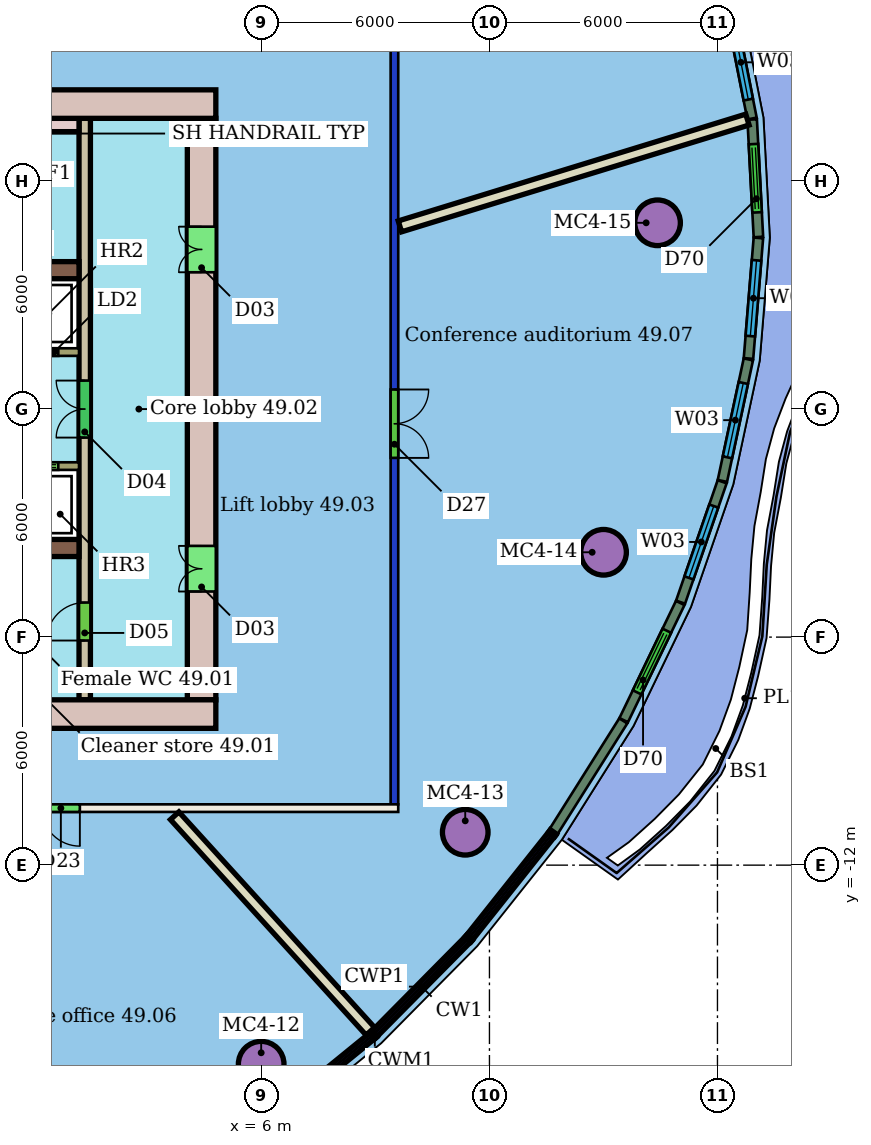
"""IFC4 building model, lengths in metres.
Left out: names, types, materials, properties, quantities, classifications, styles, units other than length and angle.
Written with IfcOpenShell. Run it as: python <this file> out.ifc"""

import sys

from ifc_helpers import new_model, si_unit, direction, frame, frame_2d, origin, origin_2d, place, context, subcontext, project, spatial, rectangle, hollow_circle, extrude, element, fill, save


model = new_model("IFC4")
c1 = context("Model", 3, precision=1e-05, world=origin(), true_north=direction((0.0, 1.0)))
c2 = subcontext(c1, "Body", "Model", "MODEL_VIEW")
j1 = project(units=[si_unit("LENGTHUNIT", "METRE"), si_unit("PLANEANGLEUNIT", "RADIAN")], contexts=[c1])
p1 = place(None, origin())
s1 = spatial("IfcSite", under=j1, at=p1, CompositionType="ELEMENT")
p2 = place(p1, origin())
s2 = spatial("IfcBuilding", under=s1, at=p2, CompositionType="ELEMENT")
p3 = place(p2, frame((0.0, 0.0, 202.9)))
s3 = spatial("IfcBuildingStorey", under=s2, at=p3, CompositionType="ELEMENT", Elevation=202.9)
for number, where, z_axis, x_axis in (
    (1, (5.993, -17.237, 0.0), (0.0, 0.0, 1.0), (1.0, 0.0, 0.0)),
    (2, (11.363, -11.134, 0.0), (0.0, 0.0, 1.0), (1.0, 0.0, 0.0)),
    (3, (15.003, -3.768, 0.0), (0.0, 0.0, 1.0), (1.0, 0.0, 0.0)),
    (4, (16.424, 4.901, 0.0), (0.0, 0.0, 1.0), (1.0, 0.0, 0.0)),
):
    element("IfcColumn", number, at=place(p3, frame(where, z_axis=z_axis, x_axis=x_axis)), inside=s3, PredefinedType="COLUMN", context=c2, shape_type="SweptSolid", body=[
        extrude(hollow_circle(Radius=0.6, WallThickness=0.045, at=origin_2d()), origin(), (0.0, 0.0, 1.0), 3.45),
    ])
p4 = place(p3, frame((9.6, -10.5, 0.0), z_axis=(0.0, 0.0, 1.0), x_axis=(-1.0, 0.0, 0.0)))
e5 = element("IfcWall", 5, at=p4, inside=s3, PredefinedType="PARTITIONING", context=c2, shape_type="SweptSolid", body=[
    extrude(rectangle(XDim=31.2, YDim=0.2, at=frame_2d((15.6, 0.0))), origin(), (0.0, 0.0, 1.0), 3.45),
])
p5 = place(p4, frame((22.002, 0.0, 0.0)))
e6 = element("IfcOpeningElement", 6, at=p5, cuts=e5, PredefinedType="OPENING", context=c2, shape_type="SweptSolid", body=[
    extrude(rectangle(XDim=1.8, YDim=2.1, at=frame_2d((0.9, 1.05))), frame((0.0, 0.11, 0.0), z_axis=(0.0, -1.0, 0.0), x_axis=(1.0, 0.0, 0.0)), (0.0, 0.0, 1.0), 0.22),
])
p6 = place(p4, frame((16.448, 0.0, 0.0)))
e7 = element("IfcOpeningElement", 7, at=p6, cuts=e5, PredefinedType="OPENING", context=c2, shape_type="SweptSolid", body=[
    extrude(rectangle(XDim=1.0, YDim=2.4, at=frame_2d((0.5, 1.2))), frame((0.0, 0.11, 0.0), z_axis=(0.0, -1.0, 0.0), x_axis=(1.0, 0.0, 0.0)), (0.0, 0.0, 1.0), 0.22),
])
p7 = place(p4, frame((8.378, 0.0, 0.0)))
e8 = element("IfcOpeningElement", 8, at=p7, cuts=e5, PredefinedType="OPENING", context=c2, shape_type="SweptSolid", body=[
    extrude(rectangle(XDim=1.0, YDim=2.4, at=frame_2d((0.5, 1.2))), frame((0.0, 0.11, 0.0), z_axis=(0.0, -1.0, 0.0), x_axis=(1.0, 0.0, 0.0)), (0.0, 0.0, 1.0), 0.22),
])
p8 = place(p3, frame((9.5, 10.4, 0.0), z_axis=(0.0, 0.0, 1.0), x_axis=(0.0, -1.0, 0.0)))
e9 = element("IfcWall", 9, at=p8, inside=s3, PredefinedType="PARTITIONING", context=c2, shape_type="SweptSolid", body=[
    extrude(rectangle(XDim=20.8, YDim=0.2, at=frame_2d((10.4, 0.0))), origin(), (0.0, 0.0, 1.0), 3.05),
])
p9 = place(p8, frame((9.885, 0.0, 0.0)))
e10 = element("IfcOpeningElement", 10, at=p9, cuts=e9, PredefinedType="OPENING", context=c2, shape_type="SweptSolid", body=[
    extrude(rectangle(XDim=1.8, YDim=2.4, at=frame_2d((0.9, 1.2))), frame((0.0, 0.11, 0.0), z_axis=(0.0, -1.0, 0.0), x_axis=(1.0, 0.0, 0.0)), (0.0, 0.0, 1.0), 0.22),
])
p10 = place(p3, frame((8.865, -16.371, 0.0), z_axis=(0.0, 0.0, 1.0), x_axis=(-0.672244315529, 0.740329372806, 0.0)))
e11 = element("IfcWall", 11, at=p10, inside=s3, PredefinedType="PARTITIONING", context=c2, shape_type="SweptSolid", body=[
    extrude(rectangle(XDim=7.659, YDim=0.3, at=frame_2d((3.83, 0.0))), origin(), (0.0, 0.0, 1.0), 3.45),
])
p11 = place(p3, frame((18.788, 7.617, 0.0), z_axis=(0.0, 0.0, 1.0), x_axis=(-0.955883790435, -0.293745092188, 0.0)))
e12 = element("IfcWall", 12, at=p11, inside=s3, PredefinedType="PARTITIONING", context=c2, shape_type="SweptSolid", body=[
    extrude(rectangle(XDim=9.566, YDim=0.3, at=frame_2d((4.783, 0.0))), origin(), (0.0, 0.0, 1.0), 3.45),
])
p12 = place(p3, frame((13.69, -11.112, 0.0), z_axis=(0.0, 0.0, 1.0), x_axis=(0.53307325399, 0.846069090489, 0.0)))
e13 = element("IfcWall", 13, at=p12, inside=s3, PredefinedType="SOLIDWALL", context=c2, shape_type="SweptSolid", body=[
    extrude(rectangle(XDim=3.437, YDim=0.25, at=frame_2d((1.718, 0.0))), origin(), (0.0, 0.0, 1.0), 3.1),
])
p13 = place(p3, frame((15.533, -8.185, 0.0), z_axis=(0.0, 0.0, 1.0), x_axis=(0.434561601859, 0.900642112156, 0.0)))
e14 = element("IfcWall", 14, at=p13, inside=s3, PredefinedType="SOLIDWALL", context=c2, shape_type="SweptSolid", body=[
    extrude(rectangle(XDim=3.424, YDim=0.25, at=frame_2d((1.712, 0.0))), origin(), (0.0, 0.0, 1.0), 3.1),
])
p14 = place(p13, frame((0.812, 0.0, 0.0)))
e15 = element("IfcOpeningElement", 15, at=p14, cuts=e14, PredefinedType="OPENING", context=c2, shape_type="SweptSolid", body=[
    extrude(rectangle(XDim=1.8, YDim=2.4, at=frame_2d((0.9, 1.2))), frame((0.0, 0.135, 0.0), z_axis=(0.0, -1.0, 0.0), x_axis=(1.0, 0.0, 0.0)), (0.0, 0.0, 1.0), 0.27),
])
p15 = place(p3, frame((17.029, -5.081, 0.0), z_axis=(0.0, 0.0, 1.0), x_axis=(0.326545099428, 0.945181621721, 0.0)))
e16 = element("IfcWall", 16, at=p15, inside=s3, PredefinedType="SOLIDWALL", context=c2, shape_type="SweptSolid", body=[
    extrude(rectangle(XDim=3.352, YDim=0.25, at=frame_2d((1.676, 0.0))), origin(), (0.0, 0.0, 1.0), 3.1),
])
p16 = place(p15, frame((0.676, 0.0, 0.9)))
e17 = element("IfcOpeningElement", 17, at=p16, cuts=e16, PredefinedType="OPENING", context=c2, shape_type="SweptSolid", body=[
    extrude(rectangle(XDim=2.0, YDim=2.1, at=frame_2d((1.0, 1.05))), frame((0.0, 0.135, 0.0), z_axis=(0.0, -1.0, 0.0), x_axis=(1.0, 0.0, 0.0)), (0.0, 0.0, 1.0), 0.27),
])
p17 = place(p3, frame((18.13, -1.89, 0.0), z_axis=(0.0, 0.0, 1.0), x_axis=(0.208906976356, 0.977935516908, 0.0)))
e18 = element("IfcWall", 18, at=p17, inside=s3, PredefinedType="SOLIDWALL", context=c2, shape_type="SweptSolid", body=[
    extrude(rectangle(XDim=3.27, YDim=0.25, at=frame_2d((1.635, 0.0))), origin(), (0.0, 0.0, 1.0), 3.1),
])
p18 = place(p17, frame((0.635, 0.0, 0.9)))
e19 = element("IfcOpeningElement", 19, at=p18, cuts=e18, PredefinedType="OPENING", context=c2, shape_type="SweptSolid", body=[
    extrude(rectangle(XDim=2.0, YDim=2.1, at=frame_2d((1.0, 1.05))), frame((0.0, 0.135, 0.0), z_axis=(0.0, -1.0, 0.0), x_axis=(1.0, 0.0, 0.0)), (0.0, 0.0, 1.0), 0.27),
])
p19 = place(p3, frame((18.816, 1.331, 0.0), z_axis=(0.0, 0.0, 1.0), x_axis=(0.082004278311, 0.996631977381, 0.0)))
e20 = element("IfcWall", 20, at=p19, inside=s3, PredefinedType="SOLIDWALL", context=c2, shape_type="SweptSolid", body=[
    extrude(rectangle(XDim=3.183, YDim=0.25, at=frame_2d((1.591, 0.0))), origin(), (0.0, 0.0, 1.0), 3.1),
])
p20 = place(p19, frame((0.591, 0.0, 0.9)))
e21 = element("IfcOpeningElement", 21, at=p20, cuts=e20, PredefinedType="OPENING", context=c2, shape_type="SweptSolid", body=[
    extrude(rectangle(XDim=2.0, YDim=2.1, at=frame_2d((1.0, 1.05))), frame((0.0, 0.135, 0.0), z_axis=(0.0, -1.0, 0.0), x_axis=(1.0, 0.0, 0.0)), (0.0, 0.0, 1.0), 0.27),
])
p21 = place(p3, frame((19.078, 4.528, 0.0), z_axis=(0.0, 0.0, 1.0), x_axis=(-0.053150699104, 0.998586502605, 0.0)))
e22 = element("IfcWall", 22, at=p21, inside=s3, PredefinedType="SOLIDWALL", context=c2, shape_type="SweptSolid", body=[
    extrude(rectangle(XDim=3.096, YDim=0.25, at=frame_2d((1.548, 0.0))), origin(), (0.0, 0.0, 1.0), 3.1),
])
p22 = place(p21, frame((0.648, 0.0, 0.0)))
e23 = element("IfcOpeningElement", 23, at=p22, cuts=e22, PredefinedType="OPENING", context=c2, shape_type="SweptSolid", body=[
    extrude(rectangle(XDim=1.8, YDim=2.4, at=frame_2d((0.9, 1.2))), frame((0.0, 0.135, 0.0), z_axis=(0.0, -1.0, 0.0), x_axis=(1.0, 0.0, 0.0)), (0.0, 0.0, 1.0), 0.27),
])
p23 = place(p3, frame((18.91, 7.645, 0.0), z_axis=(0.0, 0.0, 1.0), x_axis=(-0.194200963519, 0.980961765702, 0.0)))
e24 = element("IfcWall", 24, at=p23, inside=s3, PredefinedType="SOLIDWALL", context=c2, shape_type="SweptSolid", body=[
    extrude(rectangle(XDim=3.016, YDim=0.25, at=frame_2d((1.508, 0.0))), origin(), (0.0, 0.0, 1.0), 3.1),
])
p24 = place(p23, frame((0.508, 0.0, 0.9)))
e25 = element("IfcOpeningElement", 25, at=p24, cuts=e24, PredefinedType="OPENING", context=c2, shape_type="SweptSolid", body=[
    extrude(rectangle(XDim=2.0, YDim=2.1, at=frame_2d((1.0, 1.05))), frame((0.0, 0.135, 0.0), z_axis=(0.0, -1.0, 0.0), x_axis=(1.0, 0.0, 0.0)), (0.0, 0.0, 1.0), 0.27),
])
p25 = place(p3, frame((4.8, 8.025, 0.0), z_axis=(0.0, 0.0, 1.0), x_axis=(-1.0, 0.0, 0.0)))
e26 = element("IfcWall", 26, at=p25, inside=s3, PredefinedType="SHEAR", context=c2, shape_type="SweptSolid", body=[
    extrude(rectangle(XDim=10.8, YDim=0.75, at=frame_2d((5.4, 0.0))), origin(), (0.0, 0.0, 1.0), 3.3),
])
p26 = place(p25, frame((4.4, 0.0, 0.0)))
e27 = element("IfcOpeningElement", 27, at=p26, cuts=e26, PredefinedType="OPENING", context=c2, shape_type="SweptSolid", body=[
    extrude(rectangle(XDim=1.2, YDim=2.1, at=frame_2d((0.6, 1.05))), frame((0.0, 0.385, 0.0), z_axis=(0.0, -1.0, 0.0), x_axis=(1.0, 0.0, 0.0)), (0.0, 0.0, 1.0), 0.77),
])
p27 = place(p3, frame((-16.8, -8.025, 0.0), z_axis=(0.0, 0.0, 1.0), x_axis=(1.0, 0.0, 0.0)))
e28 = element("IfcWall", 28, at=p27, inside=s3, PredefinedType="SHEAR", context=c2, shape_type="SweptSolid", body=[
    extrude(rectangle(XDim=21.6, YDim=0.75, at=frame_2d((10.8, 0.0))), origin(), (0.0, 0.0, 1.0), 3.3),
])
p28 = place(p27, frame((4.8, 0.0, 0.0)))
e29 = element("IfcOpeningElement", 29, at=p28, cuts=e28, PredefinedType="OPENING", context=c2, shape_type="SweptSolid", body=[
    extrude(rectangle(XDim=1.2, YDim=2.1, at=frame_2d((0.6, 1.05))), frame((0.0, 0.385, 0.0), z_axis=(0.0, -1.0, 0.0), x_axis=(1.0, 0.0, 0.0)), (0.0, 0.0, 1.0), 0.77),
])
p29 = place(p3, frame((4.425, -7.65, 0.0), z_axis=(0.0, 0.0, 1.0), x_axis=(0.0, 1.0, 0.0)))
e30 = element("IfcWall", 30, at=p29, inside=s3, PredefinedType="SHEAR", context=c2, shape_type="SweptSolid", body=[
    extrude(rectangle(XDim=15.3, YDim=0.75, at=frame_2d((7.65, 0.0))), origin(), (0.0, 0.0, 1.0), 3.3),
])
p30 = place(p29, frame((2.85, 0.0, 0.0)))
e31 = element("IfcOpeningElement", 31, at=p30, cuts=e30, PredefinedType="OPENING", context=c2, shape_type="SweptSolid", body=[
    extrude(rectangle(XDim=1.2, YDim=2.1, at=frame_2d((0.6, 1.05))), frame((0.0, 0.385, 0.0), z_axis=(0.0, -1.0, 0.0), x_axis=(1.0, 0.0, 0.0)), (0.0, 0.0, 1.0), 0.77),
])
p31 = place(p29, frame((11.25, 0.0, 0.0)))
e32 = element("IfcOpeningElement", 32, at=p31, cuts=e30, PredefinedType="OPENING", context=c2, shape_type="SweptSolid", body=[
    extrude(rectangle(XDim=1.2, YDim=2.1, at=frame_2d((0.6, 1.05))), frame((0.0, 0.385, 0.0), z_axis=(0.0, -1.0, 0.0), x_axis=(1.0, 0.0, 0.0)), (0.0, 0.0, 1.0), 0.77),
])
for number, where, z_axis, x_axis in (
    (33, (-6.0, 3.655, 0.0), (0.0, 0.0, 1.0), (1.0, 0.0, 0.0)),
    (34, (-6.0, -3.655, 0.0), (0.0, 0.0, 1.0), (1.0, 0.0, 0.0)),
):
    element("IfcWall", number, at=place(p3, frame(where, z_axis=z_axis, x_axis=x_axis)), inside=s3, PredefinedType="SHEAR", context=c2, shape_type="SweptSolid", body=[
        extrude(rectangle(XDim=7.2, YDim=0.45, at=frame_2d((3.6, 0.0))), origin(), (0.0, 0.0, 1.0), 3.3),
    ])
p32 = place(p3, frame((1.35, -7.65, 0.0), z_axis=(0.0, 0.0, 1.0), x_axis=(0.0, 1.0, 0.0)))
e35 = element("IfcWall", 35, at=p32, inside=s3, PredefinedType="SHEAR", context=c2, shape_type="SweptSolid", body=[
    extrude(rectangle(XDim=15.3, YDim=0.3, at=frame_2d((7.65, 0.0))), origin(), (0.0, 0.0, 1.0), 3.3),
])
p33 = place(p32, frame((1.56, 0.0, 0.0)))
e36 = element("IfcOpeningElement", 36, at=p33, cuts=e35, PredefinedType="OPENING", context=c2, shape_type="SweptSolid", body=[
    extrude(rectangle(XDim=1.0, YDim=2.1, at=frame_2d((0.5, 1.05))), frame((0.0, 0.16, 0.0), z_axis=(0.0, -1.0, 0.0), x_axis=(1.0, 0.0, 0.0)), (0.0, 0.0, 1.0), 0.32),
])
p34 = place(p32, frame((6.9, 0.0, 0.0)))
e37 = element("IfcOpeningElement", 37, at=p34, cuts=e35, PredefinedType="OPENING", context=c2, shape_type="SweptSolid", body=[
    extrude(rectangle(XDim=1.5, YDim=2.1, at=frame_2d((0.75, 1.05))), frame((0.0, 0.16, 0.0), z_axis=(0.0, -1.0, 0.0), x_axis=(1.0, 0.0, 0.0)), (0.0, 0.0, 1.0), 0.32),
])
p35 = place(p3, frame((-13.2, 1.5, 0.0), z_axis=(0.0, 0.0, 1.0), x_axis=(1.0, 0.0, 0.0)))
e38 = element("IfcWall", 38, at=p35, inside=s3, PredefinedType="SHEAR", context=c2, shape_type="SweptSolid", body=[
    extrude(rectangle(XDim=14.4, YDim=0.2, at=frame_2d((7.2, 0.0))), origin(), (0.0, 0.0, 1.0), 3.3),
])
p36 = place(p35, frame((10.312, 0.0, 0.0)))
e39 = element("IfcOpeningElement", 39, at=p36, cuts=e38, PredefinedType="OPENING", context=c2, shape_type="SweptSolid", body=[
    extrude(rectangle(XDim=1.1, YDim=2.1, at=frame_2d((0.55, 1.05))), frame((0.0, 0.11, 0.0), z_axis=(0.0, -1.0, 0.0), x_axis=(1.0, 0.0, 0.0)), (0.0, 0.0, 1.0), 0.22),
])
p37 = place(p35, frame((12.754, 0.0, 0.0)))
e40 = element("IfcOpeningElement", 40, at=p37, cuts=e38, PredefinedType="OPENING", context=c2, shape_type="SweptSolid", body=[
    extrude(rectangle(XDim=1.1, YDim=2.1, at=frame_2d((0.55, 1.05))), frame((0.0, 0.11, 0.0), z_axis=(0.0, -1.0, 0.0), x_axis=(1.0, 0.0, 0.0)), (0.0, 0.0, 1.0), 0.22),
])
p38 = place(p35, frame((0.15, 0.0, 0.0)))
e41 = element("IfcOpeningElement", 41, at=p38, cuts=e38, PredefinedType="OPENING", context=c2, shape_type="SweptSolid", body=[
    extrude(rectangle(XDim=1.0, YDim=2.1, at=frame_2d((0.5, 1.05))), frame((0.0, 0.11, 0.0), z_axis=(0.0, -1.0, 0.0), x_axis=(1.0, 0.0, 0.0)), (0.0, 0.0, 1.0), 0.22),
])
p39 = place(p35, frame((3.365, 0.0, 0.0)))
e42 = element("IfcOpeningElement", 42, at=p39, cuts=e38, PredefinedType="OPENING", context=c2, shape_type="SweptSolid", body=[
    extrude(rectangle(XDim=1.0, YDim=2.1, at=frame_2d((0.5, 1.05))), frame((0.0, 0.11, 0.0), z_axis=(0.0, -1.0, 0.0), x_axis=(1.0, 0.0, 0.0)), (0.0, 0.0, 1.0), 0.22),
])
p40 = place(p35, frame((8.467, 0.0, 0.0)))
e43 = element("IfcOpeningElement", 43, at=p40, cuts=e38, PredefinedType="OPENING", context=c2, shape_type="SweptSolid", body=[
    extrude(rectangle(XDim=0.9, YDim=2.1, at=frame_2d((0.45, 1.05))), frame((0.0, 0.11, 0.0), z_axis=(0.0, -1.0, 0.0), x_axis=(1.0, 0.0, 0.0)), (0.0, 0.0, 1.0), 0.22),
])
p41 = place(p3, frame((1.2, -1.5, 0.0), z_axis=(0.0, 0.0, 1.0), x_axis=(-1.0, 0.0, 0.0)))
e44 = element("IfcWall", 44, at=p41, inside=s3, PredefinedType="SHEAR", context=c2, shape_type="SweptSolid", body=[
    extrude(rectangle(XDim=14.4, YDim=0.2, at=frame_2d((7.2, 0.0))), origin(), (0.0, 0.0, 1.0), 3.3),
])
p42 = place(p41, frame((7.821, 0.0, 0.0)))
e45 = element("IfcOpeningElement", 45, at=p42, cuts=e44, PredefinedType="OPENING", context=c2, shape_type="SweptSolid", body=[
    extrude(rectangle(XDim=1.2, YDim=2.1, at=frame_2d((0.6, 1.05))), frame((0.0, 0.11, 0.0), z_axis=(0.0, -1.0, 0.0), x_axis=(1.0, 0.0, 0.0)), (0.0, 0.0, 1.0), 0.22),
])
p43 = place(p41, frame((0.546, 0.0, 0.0)))
e46 = element("IfcOpeningElement", 46, at=p43, cuts=e44, PredefinedType="OPENING", context=c2, shape_type="SweptSolid", body=[
    extrude(rectangle(XDim=1.1, YDim=2.1, at=frame_2d((0.55, 1.05))), frame((0.0, 0.11, 0.0), z_axis=(0.0, -1.0, 0.0), x_axis=(1.0, 0.0, 0.0)), (0.0, 0.0, 1.0), 0.22),
])
p44 = place(p41, frame((2.592, 0.0, 0.0)))
e47 = element("IfcOpeningElement", 47, at=p44, cuts=e44, PredefinedType="OPENING", context=c2, shape_type="SweptSolid", body=[
    extrude(rectangle(XDim=0.9, YDim=2.1, at=frame_2d((0.45, 1.05))), frame((0.0, 0.11, 0.0), z_axis=(0.0, -1.0, 0.0), x_axis=(1.0, 0.0, 0.0)), (0.0, 0.0, 1.0), 0.22),
])
p45 = place(p3, frame((0.4, 7.475, 0.0), z_axis=(0.0, 0.0, 1.0), x_axis=(1.0, 0.0, 0.0)))
e48 = element("IfcWall", 48, at=p45, inside=s3, PredefinedType="SHEAR", context=c2, shape_type="SweptSolid", body=[
    extrude(rectangle(XDim=0.8, YDim=0.35, at=frame_2d((0.4, 0.0))), origin(), (0.0, 0.0, 1.0), 3.3),
])
p46 = place(p7, origin())
e49 = element("IfcDoor", 49, at=p46, inside=s3, OperationType="SINGLE_SWING_LEFT", PredefinedType="DOOR", context=c2, shape_type="SweptSolid", body=[
    extrude(rectangle(XDim=1.0, YDim=2.4, at=frame_2d((0.5, 1.2))), frame((0.0, 0.025, 0.0), z_axis=(0.0, -1.0, 0.0), x_axis=(1.0, 0.0, 0.0)), (0.0, 0.0, 1.0), 0.05),
])
fill(e8, e49)
p47 = place(p9, origin())
e50 = element("IfcDoor", 50, at=p47, inside=s3, OperationType="DOUBLE_DOOR_SINGLE_SWING", PredefinedType="DOOR", context=c2, shape_type="SweptSolid", body=[
    extrude(rectangle(XDim=1.8, YDim=2.4, at=frame_2d((0.9, 1.2))), frame((0.0, 0.025, 0.0), z_axis=(0.0, -1.0, 0.0), x_axis=(1.0, 0.0, 0.0)), (0.0, 0.0, 1.0), 0.05),
])
fill(e10, e50)
p48 = place(p14, origin())
e51 = element("IfcDoor", 51, at=p48, inside=s3, OperationType="DOUBLE_DOOR_SLIDING", PredefinedType="DOOR", context=c2, shape_type="SweptSolid", body=[
    extrude(rectangle(XDim=1.8, YDim=2.4, at=frame_2d((0.9, 1.2))), frame((0.0, 0.025, 0.0), z_axis=(0.0, -1.0, 0.0), x_axis=(1.0, 0.0, 0.0)), (0.0, 0.0, 1.0), 0.05),
])
fill(e15, e51)
p49 = place(p16, origin())
e52 = element("IfcWindow", 52, at=p49, inside=s3, PartitioningType="SINGLE_PANEL", PredefinedType="WINDOW", context=c2, shape_type="SweptSolid", body=[
    extrude(rectangle(XDim=2.0, YDim=2.1, at=frame_2d((1.0, 1.05))), frame((0.0, 0.03, 0.0), z_axis=(0.0, -1.0, 0.0), x_axis=(1.0, 0.0, 0.0)), (0.0, 0.0, 1.0), 0.06),
])
fill(e17, e52)
p50 = place(p18, origin())
e53 = element("IfcWindow", 53, at=p50, inside=s3, PartitioningType="SINGLE_PANEL", PredefinedType="WINDOW", context=c2, shape_type="SweptSolid", body=[
    extrude(rectangle(XDim=2.0, YDim=2.1, at=frame_2d((1.0, 1.05))), frame((0.0, 0.03, 0.0), z_axis=(0.0, -1.0, 0.0), x_axis=(1.0, 0.0, 0.0)), (0.0, 0.0, 1.0), 0.06),
])
fill(e19, e53)
p51 = place(p20, origin())
e54 = element("IfcWindow", 54, at=p51, inside=s3, PartitioningType="SINGLE_PANEL", PredefinedType="WINDOW", context=c2, shape_type="SweptSolid", body=[
    extrude(rectangle(XDim=2.0, YDim=2.1, at=frame_2d((1.0, 1.05))), frame((0.0, 0.03, 0.0), z_axis=(0.0, -1.0, 0.0), x_axis=(1.0, 0.0, 0.0)), (0.0, 0.0, 1.0), 0.06),
])
fill(e21, e54)
p52 = place(p22, origin())
e55 = element("IfcDoor", 55, at=p52, inside=s3, OperationType="DOUBLE_DOOR_SLIDING", PredefinedType="DOOR", context=c2, shape_type="SweptSolid", body=[
    extrude(rectangle(XDim=1.8, YDim=2.4, at=frame_2d((0.9, 1.2))), frame((0.0, 0.025, 0.0), z_axis=(0.0, -1.0, 0.0), x_axis=(1.0, 0.0, 0.0)), (0.0, 0.0, 1.0), 0.05),
])
fill(e23, e55)
p53 = place(p24, origin())
e56 = element("IfcWindow", 56, at=p53, inside=s3, PartitioningType="SINGLE_PANEL", PredefinedType="WINDOW", context=c2, shape_type="SweptSolid", body=[
    extrude(rectangle(XDim=2.0, YDim=2.1, at=frame_2d((1.0, 1.05))), frame((0.0, 0.03, 0.0), z_axis=(0.0, -1.0, 0.0), x_axis=(1.0, 0.0, 0.0)), (0.0, 0.0, 1.0), 0.06),
])
fill(e25, e56)
p54 = place(p30, origin())
e57 = element("IfcDoor", 57, at=p54, inside=s3, OperationType="DOUBLE_DOOR_SINGLE_SWING", PredefinedType="NOTDEFINED", context=c2, shape_type="SweptSolid", body=[
    extrude(rectangle(XDim=1.2, YDim=2.1, at=frame_2d((0.6, 1.05))), frame((0.0, 0.025, 0.0), z_axis=(0.0, -1.0, 0.0), x_axis=(1.0, 0.0, 0.0)), (0.0, 0.0, 1.0), 0.05),
])
fill(e31, e57)
p55 = place(p31, origin())
e58 = element("IfcDoor", 58, at=p55, inside=s3, OperationType="DOUBLE_DOOR_SINGLE_SWING", PredefinedType="NOTDEFINED", context=c2, shape_type="SweptSolid", body=[
    extrude(rectangle(XDim=1.2, YDim=2.1, at=frame_2d((0.6, 1.05))), frame((0.0, 0.025, 0.0), z_axis=(0.0, -1.0, 0.0), x_axis=(1.0, 0.0, 0.0)), (0.0, 0.0, 1.0), 0.05),
])
fill(e32, e58)
p56 = place(p33, origin())
e59 = element("IfcDoor", 59, at=p56, inside=s3, OperationType="SINGLE_SWING_LEFT", PredefinedType="NOTDEFINED", context=c2, shape_type="SweptSolid", body=[
    extrude(rectangle(XDim=1.0, YDim=2.1, at=frame_2d((0.5, 1.05))), frame((0.0, 0.025, 0.0), z_axis=(0.0, -1.0, 0.0), x_axis=(1.0, 0.0, 0.0)), (0.0, 0.0, 1.0), 0.05),
])
fill(e36, e59)
p57 = place(p34, origin())
e60 = element("IfcDoor", 60, at=p57, inside=s3, OperationType="DOUBLE_DOOR_SINGLE_SWING", PredefinedType="NOTDEFINED", context=c2, shape_type="SweptSolid", body=[
    extrude(rectangle(XDim=1.5, YDim=2.1, at=frame_2d((0.75, 1.05))), frame((0.0, 0.025, 0.0), z_axis=(0.0, -1.0, 0.0), x_axis=(1.0, 0.0, 0.0)), (0.0, 0.0, 1.0), 0.05),
])
fill(e37, e60)
p58 = place(p37, origin())
e61 = element("IfcDoor", 61, at=p58, inside=s3, OperationType="DOUBLE_DOOR_SLIDING", PredefinedType="NOTDEFINED", context=c2, shape_type="SweptSolid", body=[
    extrude(rectangle(XDim=1.1, YDim=2.1, at=frame_2d((0.55, 1.05))), frame((0.0, 0.025, 0.0), z_axis=(0.0, -1.0, 0.0), x_axis=(1.0, 0.0, 0.0)), (0.0, 0.0, 1.0), 0.05),
])
fill(e40, e61)
p59 = place(p43, origin())
e62 = element("IfcDoor", 62, at=p59, inside=s3, OperationType="DOUBLE_DOOR_SLIDING", PredefinedType="NOTDEFINED", context=c2, shape_type="SweptSolid", body=[
    extrude(rectangle(XDim=1.1, YDim=2.1, at=frame_2d((0.55, 1.05))), frame((0.0, 0.025, 0.0), z_axis=(0.0, -1.0, 0.0), x_axis=(1.0, 0.0, 0.0)), (0.0, 0.0, 1.0), 0.05),
])
fill(e46, e62)
save(model, sys.argv[1])
